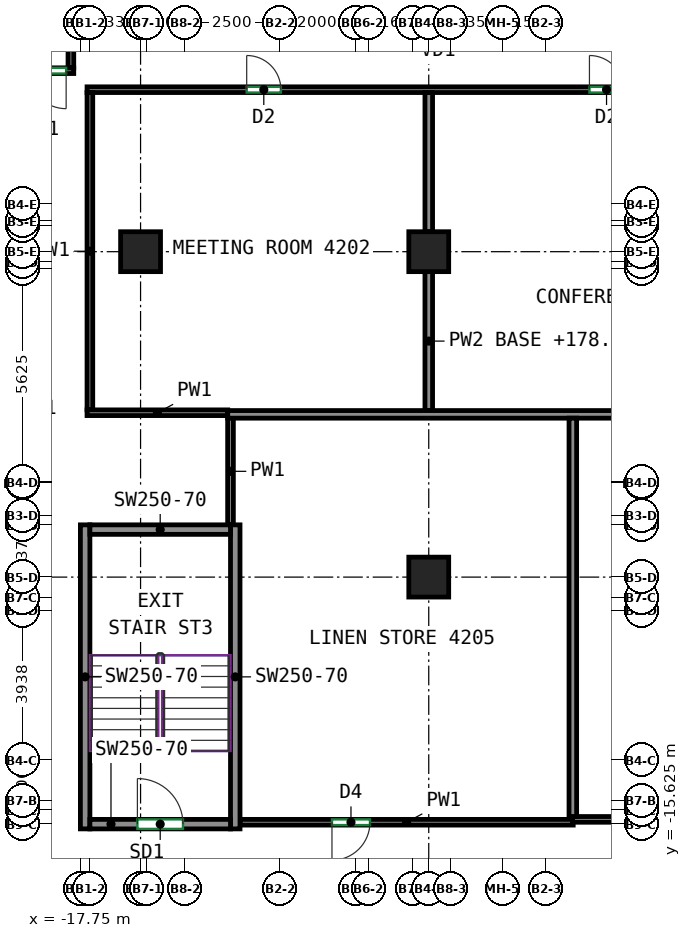
"""IFC4 building model, lengths in metres.
Left out: names, types, materials, properties, quantities, classifications, styles, units other than length and angle.
Written with IfcOpenShell. Run it as: python <this file> out.ifc"""

import sys

from ifc_helpers import new_model, si_unit, direction, frame, frame_2d, origin, origin_2d, place, context, subcontext, project, spatial, rectangle, extrude, source, transform, mapped, element, fill, save


model = new_model("IFC4")
c1 = context("Model", 3, precision=1e-05, world=origin(), true_north=direction((0.0, 1.0)))
c2 = subcontext(c1, "Body", "Model", "MODEL_VIEW")
j1 = project(units=[si_unit("LENGTHUNIT", "METRE"), si_unit("PLANEANGLEUNIT", "RADIAN")], contexts=[c1])
p1 = place(None, origin())
s1 = spatial("IfcSite", under=j1, at=p1, CompositionType="ELEMENT")
p2 = place(p1, origin())
s2 = spatial("IfcBuilding", under=s1, at=p2, CompositionType="ELEMENT")
p3 = place(p2, frame((0.0, 0.0, 178.7)))
s3 = spatial("IfcBuildingStorey", under=s2, at=p3, CompositionType="ELEMENT", Elevation=178.7)
m1 = source(origin(), c2, "Body", "SweptSolid", [
    extrude(rectangle(XDim=1.05, YDim=1.05, at=origin_2d()), origin(), (0.0, 0.0, 1.0), 3.12),
])
for number, where, z_axis, x_axis in (
    (1, (-16.167, -0.562, 0.0), (0.0, 0.0, 1.0), (1.0, 0.0, 0.0)),
    (2, (-8.583, -9.125, 0.0), (0.0, 0.0, 1.0), (1.0, 0.0, 0.0)),
    (3, (-8.583, -0.562, 0.0), (0.0, 0.0, 1.0), (1.0, 0.0, 0.0)),
):
    element("IfcColumn", number, at=place(p3, frame(where, z_axis=z_axis, x_axis=x_axis)), inside=s3, PredefinedType="COLUMN", context=c2, shape_type="MappedRepresentation", body=[
        mapped(m1, transform((0.0, 0.0, 0.0))),
    ])
m2 = source(origin(), c2, "Body", "SweptSolid", [
    extrude(rectangle(XDim=8.0, YDim=0.25, at=frame_2d((4.0, 0.0))), origin(), (0.0, 0.0, 1.0), 3.12),
])
for number, where, z_axis, x_axis in (
    (4, (-17.625, -15.75, 0.0), (0.0, 0.0, 1.0), (0.0, 1.0, 0.0)),
    (5, (-13.675, -15.75, 0.0), (0.0, 0.0, 1.0), (0.0, 1.0, 0.0)),
):
    element("IfcWall", number, at=place(p3, frame(where, z_axis=z_axis, x_axis=x_axis)), inside=s3, PredefinedType="SHEAR", context=c2, shape_type="MappedRepresentation", body=[
        mapped(m2, transform((0.0, 0.0, 0.0))),
    ])
m3 = source(origin(), c2, "Body", "SweptSolid", [
    extrude(rectangle(XDim=3.7, YDim=0.25, at=frame_2d((1.85, 0.0))), origin(), (0.0, 0.0, 1.0), 3.12),
])
p4 = place(p3, frame((-17.5, -15.625, 0.0), z_axis=(0.0, 0.0, 1.0), x_axis=(1.0, 0.0, 0.0)))
e6 = element("IfcWall", 6, at=p4, inside=s3, PredefinedType="SHEAR", context=c2, shape_type="MappedRepresentation", body=[
    mapped(m3, transform((0.0, 0.0, 0.0))),
])
p5 = place(p4, frame((1.25, 0.0, 0.0)))
e7 = element("IfcOpeningElement", 7, at=p5, cuts=e6, PredefinedType="OPENING", context=c2, shape_type="SweptSolid", body=[
    extrude(rectangle(XDim=1.2, YDim=2.1, at=frame_2d((0.6, 1.05))), frame((0.0, 0.135, 0.0), z_axis=(0.0, -1.0, 0.0), x_axis=(1.0, 0.0, 0.0)), (0.0, 0.0, 1.0), 0.27),
])
p6 = place(p3, frame((-17.5, -7.875, 0.0), z_axis=(0.0, 0.0, 1.0), x_axis=(1.0, 0.0, 0.0)))
e8 = element("IfcWall", 8, at=p6, inside=s3, PredefinedType="SHEAR", context=c2, shape_type="MappedRepresentation", body=[
    mapped(m3, transform((0.0, 0.0, 0.0))),
])
p7 = place(p3, frame((-17.925, 4.2, 0.0), z_axis=(0.0, 0.0, 1.0), x_axis=(-1.0, 0.0, 0.0)))
e9 = element("IfcWall", 9, at=p7, inside=s3, PredefinedType="PARTITIONING", context=c2, shape_type="SweptSolid", body=[
    extrude(rectangle(XDim=2.109, YDim=0.15, at=frame_2d((1.054, 0.0))), origin(), (0.0, 0.0, 1.0), 3.12),
])
p8 = place(p7, frame((0.2, 0.0, 0.0)))
e10 = element("IfcOpeningElement", 10, at=p8, cuts=e9, PredefinedType="OPENING", context=c2, shape_type="SweptSolid", body=[
    extrude(rectangle(XDim=1.0, YDim=2.1, at=frame_2d((0.5, 1.05))), frame((0.0, 0.085, 0.0), z_axis=(0.0, -1.0, 0.0), x_axis=(1.0, 0.0, 0.0)), (0.0, 0.0, 1.0), 0.17),
])
p9 = place(p3, frame((-18.0, 4.275, 0.0), z_axis=(0.0, 0.0, 1.0), x_axis=(0.0, 1.0, 0.0)))
e11 = element("IfcWall", 11, at=p9, inside=s3, PredefinedType="PARTITIONING", context=c2, shape_type="SweptSolid", body=[
    extrude(rectangle(XDim=1.485, YDim=0.15, at=frame_2d((0.743, 0.0))), origin(), (0.0, 0.0, 1.0), 3.12),
])
p10 = place(p3, frame((-17.575, 3.7, 0.0), z_axis=(0.0, 0.0, 1.0), x_axis=(1.0, 0.0, 0.0)))
e12 = element("IfcWall", 12, at=p10, inside=s3, PredefinedType="PARTITIONING", context=c2, shape_type="SweptSolid", body=[
    extrude(rectangle(XDim=33.85, YDim=0.15, at=frame_2d((16.925, 0.0))), origin(), (0.0, 0.0, 1.0), 3.12),
])
p11 = place(p10, frame((4.201, 0.0, 0.0)))
e13 = element("IfcOpeningElement", 13, at=p11, cuts=e12, PredefinedType="OPENING", context=c2, shape_type="SweptSolid", body=[
    extrude(rectangle(XDim=0.9, YDim=2.1, at=frame_2d((0.45, 1.05))), frame((0.0, 0.085, 0.0), z_axis=(0.0, -1.0, 0.0), x_axis=(1.0, 0.0, 0.0)), (0.0, 0.0, 1.0), 0.17),
])
p12 = place(p10, frame((13.22, 0.0, 0.0)))
e14 = element("IfcOpeningElement", 14, at=p12, cuts=e12, PredefinedType="OPENING", context=c2, shape_type="SweptSolid", body=[
    extrude(rectangle(XDim=0.9, YDim=2.1, at=frame_2d((0.45, 1.05))), frame((0.0, 0.085, 0.0), z_axis=(0.0, -1.0, 0.0), x_axis=(1.0, 0.0, 0.0)), (0.0, 0.0, 1.0), 0.17),
])
p13 = place(p10, frame((23.959, 0.0, 0.0)))
e15 = element("IfcOpeningElement", 15, at=p13, cuts=e12, PredefinedType="OPENING", context=c2, shape_type="SweptSolid", body=[
    extrude(rectangle(XDim=0.9, YDim=2.1, at=frame_2d((0.45, 1.05))), frame((0.0, 0.085, 0.0), z_axis=(0.0, -1.0, 0.0), x_axis=(1.0, 0.0, 0.0)), (0.0, 0.0, 1.0), 0.17),
])
p14 = place(p3, frame((-17.5, -4.725, 0.0), z_axis=(0.0, 0.0, 1.0), x_axis=(0.0, 1.0, 0.0)))
e16 = element("IfcWall", 16, at=p14, inside=s3, PredefinedType="PARTITIONING", context=c2, shape_type="SweptSolid", body=[
    extrude(rectangle(XDim=8.35, YDim=0.15, at=frame_2d((4.175, 0.0))), origin(), (0.0, 0.0, 1.0), 3.12),
])
p15 = place(p3, frame((-17.575, -4.8, 0.0), z_axis=(0.0, 0.0, 1.0), x_axis=(1.0, 0.0, 0.0)))
e17 = element("IfcWall", 17, at=p15, inside=s3, PredefinedType="PARTITIONING", context=c2, shape_type="SweptSolid", body=[
    extrude(rectangle(XDim=3.702, YDim=0.15, at=frame_2d((1.851, 0.0))), origin(), (0.0, 0.0, 1.0), 3.12),
])
p16 = place(p3, frame((-13.8, -7.75, 0.0), z_axis=(0.0, 0.0, 1.0), x_axis=(0.0, 1.0, 0.0)))
e18 = element("IfcWall", 18, at=p16, inside=s3, PredefinedType="PARTITIONING", context=c2, shape_type="SweptSolid", body=[
    extrude(rectangle(XDim=2.817, YDim=0.15, at=frame_2d((1.408, 0.0))), origin(), (0.0, 0.0, 1.0), 3.12),
])
p17 = place(p3, frame((-4.782, -15.575, 0.0), z_axis=(0.0, 0.0, 1.0), x_axis=(-1.0, 0.0, 0.0)))
e19 = element("IfcWall", 19, at=p17, inside=s3, PredefinedType="PARTITIONING", context=c2, shape_type="SweptSolid", body=[
    extrude(rectangle(XDim=8.768, YDim=0.15, at=frame_2d((4.384, 0.0))), origin(), (0.0, 0.0, 1.0), 3.12),
])
p18 = place(p17, frame((5.348, 0.0, 0.0)))
e20 = element("IfcOpeningElement", 20, at=p18, cuts=e19, PredefinedType="OPENING", context=c2, shape_type="SweptSolid", body=[
    extrude(rectangle(XDim=1.0, YDim=2.1, at=frame_2d((0.5, 1.05))), frame((0.0, 0.085, 0.0), z_axis=(0.0, -1.0, 0.0), x_axis=(1.0, 0.0, 0.0)), (0.0, 0.0, 1.0), 0.17),
])
p19 = place(p3, frame((-4.802, -15.5, 0.0), z_axis=(0.0, 0.0, 1.0), x_axis=(1.0, 0.0, 0.0)))
e21 = element("IfcWall", 21, at=p19, inside=s3, PredefinedType="PARTITIONING", context=c2, shape_type="SweptSolid", body=[
    extrude(rectangle(XDim=21.077, YDim=0.15, at=frame_2d((10.539, 0.0))), origin(), (0.0, 0.0, 1.0), 3.12),
])
p20 = place(p19, frame((6.372, 0.0, 0.0)))
e22 = element("IfcOpeningElement", 22, at=p20, cuts=e21, PredefinedType="OPENING", context=c2, shape_type="SweptSolid", body=[
    extrude(rectangle(XDim=0.9, YDim=2.1, at=frame_2d((0.45, 1.05))), frame((0.0, 0.085, 0.0), z_axis=(0.0, -1.0, 0.0), x_axis=(1.0, 0.0, 0.0)), (0.0, 0.0, 1.0), 0.17),
])
p21 = place(p19, frame((7.815, 0.0, 0.0)))
e23 = element("IfcOpeningElement", 23, at=p21, cuts=e21, PredefinedType="OPENING", context=c2, shape_type="SweptSolid", body=[
    extrude(rectangle(XDim=0.9, YDim=2.1, at=frame_2d((0.45, 1.05))), frame((0.0, 0.085, 0.0), z_axis=(0.0, -1.0, 0.0), x_axis=(1.0, 0.0, 0.0)), (0.0, 0.0, 1.0), 0.17),
])
p22 = place(p3, frame((-8.583, -0.037, 0.0), z_axis=(0.0, 0.0, 1.0), x_axis=(0.0, 1.0, 0.0)))
e24 = element("IfcWall", 24, at=p22, inside=s3, PredefinedType="PARTITIONING", context=c2, shape_type="SweptSolid", body=[
    extrude(rectangle(XDim=3.66, YDim=0.2, at=frame_2d((1.83, 0.0))), origin(), (0.0, 0.0, 1.0), 3.12),
])
p23 = place(p3, frame((-8.583, -4.743, 0.0), z_axis=(0.0, 0.0, 1.0), x_axis=(0.0, 1.0, 0.0)))
e25 = element("IfcWall", 25, at=p23, inside=s3, PredefinedType="PARTITIONING", context=c2, shape_type="SweptSolid", body=[
    extrude(rectangle(XDim=3.656, YDim=0.2, at=frame_2d((1.828, 0.0))), origin(), (0.0, 0.0, 1.0), 2.52),
])
p24 = place(p3, frame((-13.873, -4.843, 0.0), z_axis=(0.0, 0.0, 1.0), x_axis=(1.0, 0.0, 0.0)))
e26 = element("IfcWall", 26, at=p24, inside=s3, PredefinedType="PARTITIONING", context=c2, shape_type="SweptSolid", body=[
    extrude(rectangle(XDim=30.146, YDim=0.2, at=frame_2d((15.073, 0.0))), origin(), (0.0, 0.0, 1.0), 3.12),
])
p25 = place(p3, frame((-4.792, -15.423, 0.0), z_axis=(0.0, 0.0, 1.0), x_axis=(0.0, 1.0, 0.0)))
e27 = element("IfcWall", 27, at=p25, inside=s3, PredefinedType="PARTITIONING", context=c2, shape_type="SweptSolid", body=[
    extrude(rectangle(XDim=10.48, YDim=0.2, at=frame_2d((5.24, 0.0))), origin(), (0.0, 0.0, 1.0), 3.12),
])
p26 = place(p5, origin())
e28 = element("IfcDoor", 28, at=p26, inside=s3, OperationType="DOUBLE_DOOR_SINGLE_SWING", PredefinedType="DOOR", context=c2, shape_type="SweptSolid", body=[
    extrude(rectangle(XDim=1.2, YDim=2.1, at=frame_2d((0.6, 1.05))), frame((0.0, 0.025, 0.0), z_axis=(0.0, -1.0, 0.0), x_axis=(1.0, 0.0, 0.0)), (0.0, 0.0, 1.0), 0.05),
])
fill(e7, e28)
p27 = place(p18, origin())
e29 = element("IfcDoor", 29, at=p27, inside=s3, OperationType="SINGLE_SWING_RIGHT", PredefinedType="DOOR", context=c2, shape_type="SweptSolid", body=[
    extrude(rectangle(XDim=1.0, YDim=2.1, at=frame_2d((0.5, 1.05))), frame((0.0, 0.025, 0.0), z_axis=(0.0, -1.0, 0.0), x_axis=(1.0, 0.0, 0.0)), (0.0, 0.0, 1.0), 0.05),
])
fill(e20, e29)
p28 = place(p11, origin())
e30 = element("IfcDoor", 30, at=p28, inside=s3, OperationType="SINGLE_SWING_LEFT", PredefinedType="DOOR", context=c2, shape_type="SweptSolid", body=[
    extrude(rectangle(XDim=0.9, YDim=2.1, at=frame_2d((0.45, 1.05))), frame((0.0, 0.025, 0.0), z_axis=(0.0, -1.0, 0.0), x_axis=(1.0, 0.0, 0.0)), (0.0, 0.0, 1.0), 0.05),
])
fill(e13, e30)
p29 = place(p12, origin())
e31 = element("IfcDoor", 31, at=p29, inside=s3, OperationType="SINGLE_SWING_LEFT", PredefinedType="DOOR", context=c2, shape_type="SweptSolid", body=[
    extrude(rectangle(XDim=0.9, YDim=2.1, at=frame_2d((0.45, 1.05))), frame((0.0, 0.025, 0.0), z_axis=(0.0, -1.0, 0.0), x_axis=(1.0, 0.0, 0.0)), (0.0, 0.0, 1.0), 0.05),
])
fill(e14, e31)
p30 = place(p8, origin())
e32 = element("IfcDoor", 32, at=p30, inside=s3, OperationType="SINGLE_SWING_LEFT", PredefinedType="DOOR", context=c2, shape_type="SweptSolid", body=[
    extrude(rectangle(XDim=1.0, YDim=2.1, at=frame_2d((0.5, 1.05))), frame((0.0, 0.025, 0.0), z_axis=(0.0, -1.0, 0.0), x_axis=(1.0, 0.0, 0.0)), (0.0, 0.0, 1.0), 0.05),
])
fill(e10, e32)
save(model, sys.argv[1])
